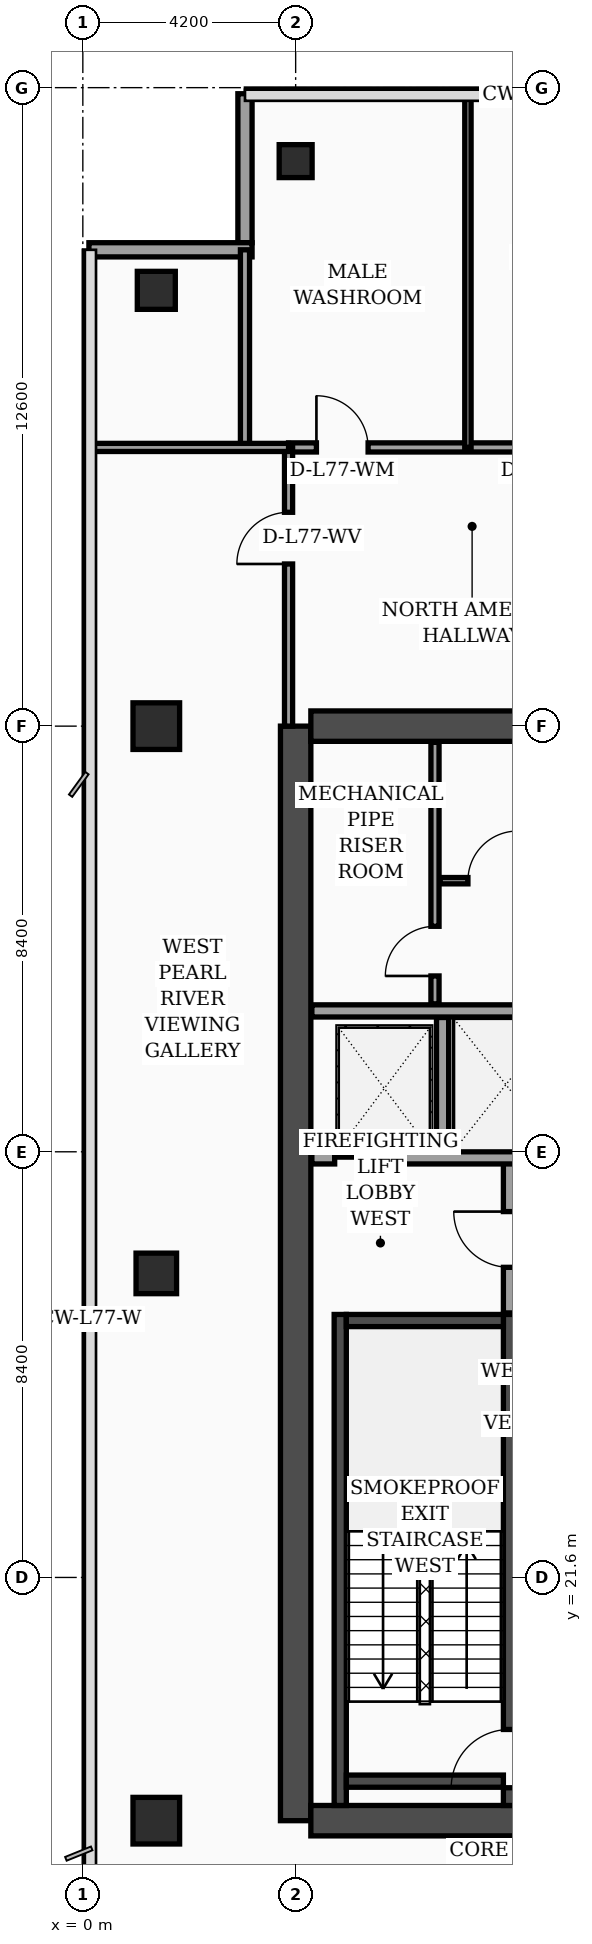
"""IFC4 building model, lengths in metres.
Left out: names, types, materials, properties, quantities, classifications, styles, units other than length and angle.
Written with IfcOpenShell. Run it as: python <this file> out.ifc"""

import sys

from ifc_helpers import new_model, si_unit, direction, frame, frame_2d, origin, origin_2d, place, context, subcontext, project, spatial, rectangle, hollow_rectangle, extrude, element, fill, save


model = new_model("IFC4")
c1 = context("Model", 3, precision=1e-05, world=origin(), true_north=direction((0.0, 1.0)))
c2 = subcontext(c1, "Body", "Model", "MODEL_VIEW")
j1 = project(units=[si_unit("LENGTHUNIT", "METRE"), si_unit("PLANEANGLEUNIT", "RADIAN")], contexts=[c1])
p1 = place(None, origin())
s1 = spatial("IfcSite", under=j1, at=p1, CompositionType="ELEMENT")
p2 = place(p1, origin())
s2 = spatial("IfcBuilding", under=s1, at=p2, CompositionType="ELEMENT")
p3 = place(p2, frame((0.0, 0.0, 311.5)))
s3 = spatial("IfcBuildingStorey", under=s2, at=p3, CompositionType="ELEMENT", Elevation=311.5)
p4 = place(p3, frame((4.2, 16.8, 0.0), z_axis=(0.0, 0.0, 1.0), x_axis=(0.0, 1.0, 0.0)))
e1 = element("IfcWall", 1, at=p4, inside=s3, PredefinedType="SHEAR", context=c2, shape_type="SweptSolid", body=[
    extrude(rectangle(XDim=21.6, YDim=0.6, at=frame_2d((10.8, 0.0))), origin(), (0.0, 0.0, 1.0), 4.26),
])
p5 = place(p3, frame((4.5, 38.4, 0.0), z_axis=(0.0, 0.0, 1.0), x_axis=(1.0, 0.0, 0.0)))
e2 = element("IfcWall", 2, at=p5, inside=s3, PredefinedType="SHEAR", context=c2, shape_type="SweptSolid", body=[
    extrude(rectangle(XDim=10.2, YDim=0.6, at=frame_2d((5.1, 0.0))), origin(), (0.0, 0.0, 1.0), 4.26),
])
p6 = place(p5, frame((5.8, 0.0, 0.0)))
e3 = element("IfcOpeningElement", 3, at=p6, cuts=e2, PredefinedType="OPENING", context=c2, shape_type="SweptSolid", body=[
    extrude(rectangle(XDim=1.1, YDim=2.2, at=frame_2d((0.55, 1.1))), frame((0.0, 0.31, 0.0), z_axis=(0.0, -1.0, 0.0), x_axis=(1.0, 0.0, 0.0)), (0.0, 0.0, 1.0), 0.62),
])
p7 = place(p3, frame((4.5, 16.8, 0.0), z_axis=(0.0, 0.0, 1.0), x_axis=(1.0, 0.0, 0.0)))
e4 = element("IfcWall", 4, at=p7, inside=s3, PredefinedType="SHEAR", context=c2, shape_type="SweptSolid", body=[
    extrude(rectangle(XDim=10.2, YDim=0.6, at=frame_2d((5.1, 0.0))), origin(), (0.0, 0.0, 1.0), 4.26),
])
p8 = place(p3, frame((5.08, 17.1, 0.0), z_axis=(0.0, 0.0, 1.0), x_axis=(0.0, 1.0, 0.0)))
e5 = element("IfcWall", 5, at=p8, inside=s3, PredefinedType="SOLIDWALL", context=c2, shape_type="SweptSolid", body=[
    extrude(rectangle(XDim=9.69, YDim=0.24, at=frame_2d((4.845, 0.0))), origin(), (0.0, 0.0, 1.0), 4.26),
])
p9 = place(p3, frame((8.42, 17.1, 0.0), z_axis=(0.0, 0.0, 1.0), x_axis=(0.0, 1.0, 0.0)))
e6 = element("IfcWall", 6, at=p9, inside=s3, PredefinedType="SOLIDWALL", context=c2, shape_type="SweptSolid", body=[
    extrude(rectangle(XDim=9.69, YDim=0.24, at=frame_2d((4.845, 0.0))), origin(), (0.0, 0.0, 1.0), 4.26),
])
p10 = place(p9, frame((0.35, 0.0, 0.0)))
e7 = element("IfcOpeningElement", 7, at=p10, cuts=e6, PredefinedType="OPENING", context=c2, shape_type="SweptSolid", body=[
    extrude(rectangle(XDim=1.15, YDim=2.2, at=frame_2d((0.575, 1.1))), frame((0.0, 0.13, 0.0), z_axis=(0.0, -1.0, 0.0), x_axis=(1.0, 0.0, 0.0)), (0.0, 0.0, 1.0), 0.26),
])
for number, where, z_axis, x_axis in (
    (8, (5.2, 17.58, 0.0), (0.0, 0.0, 1.0), (1.0, 0.0, 0.0)),
    (9, (5.2, 26.67, 0.0), (0.0, 0.0, 1.0), (1.0, 0.0, 0.0)),
):
    element("IfcWall", number, at=place(p3, frame(where, z_axis=z_axis, x_axis=x_axis)), inside=s3, PredefinedType="SOLIDWALL", context=c2, shape_type="SweptSolid", body=[
        extrude(rectangle(XDim=3.1, YDim=0.24, at=frame_2d((1.55, 0.0))), origin(), (0.0, 0.0, 1.0), 4.26),
    ])
p11 = place(p3, frame((1.45, 16.8, 0.0), z_axis=(0.0, 0.0, 1.0), x_axis=(1.0, 0.0, 0.0)))
e10 = element("IfcColumn", 10, at=p11, inside=s3, PredefinedType="COLUMN", context=c2, shape_type="SweptSolid", body=[
    extrude(rectangle(XDim=0.92, YDim=0.92, at=origin_2d()), origin(), (0.0, 0.0, 1.0), 4.26),
])
p12 = place(p3, frame((1.45, 27.6, 0.0), z_axis=(0.0, 0.0, 1.0), x_axis=(1.0, 0.0, 0.0)))
e11 = element("IfcColumn", 11, at=p12, inside=s3, PredefinedType="COLUMN", context=c2, shape_type="SweptSolid", body=[
    extrude(rectangle(XDim=0.8, YDim=0.8, at=origin_2d()), origin(), (0.0, 0.0, 1.0), 4.26),
])
p13 = place(p3, frame((1.45, 38.4, 0.0), z_axis=(0.0, 0.0, 1.0), x_axis=(1.0, 0.0, 0.0)))
e12 = element("IfcColumn", 12, at=p13, inside=s3, PredefinedType="COLUMN", context=c2, shape_type="SweptSolid", body=[
    extrude(rectangle(XDim=0.92, YDim=0.92, at=origin_2d()), origin(), (0.0, 0.0, 1.0), 4.26),
])
p14 = place(p3, frame((1.45, 47.0, 0.0), z_axis=(0.0, 0.0, 1.0), x_axis=(1.0, 0.0, 0.0)))
e13 = element("IfcColumn", 13, at=p14, inside=s3, PredefinedType="COLUMN", context=c2, shape_type="SweptSolid", body=[
    extrude(hollow_rectangle(XDim=0.75, YDim=0.75, WallThickness=0.032, at=origin_2d()), origin(), (0.0, 0.0, 1.0), 4.26),
])
p15 = place(p3, frame((4.2, 49.55, 0.0), z_axis=(0.0, 0.0, 1.0), x_axis=(1.0, 0.0, 0.0)))
e14 = element("IfcColumn", 14, at=p15, inside=s3, PredefinedType="COLUMN", context=c2, shape_type="SweptSolid", body=[
    extrude(hollow_rectangle(XDim=0.65, YDim=0.65, WallThickness=0.028, at=origin_2d()), origin(), (0.0, 0.0, 1.0), 4.26),
])
p16 = place(p3, frame((3.2, 50.88, 0.0), z_axis=(0.0, 0.0, 1.0), x_axis=(0.0, -1.0, 0.0)))
e15 = element("IfcWall", 15, at=p16, inside=s3, PredefinedType="SOLIDWALL", context=c2, shape_type="SweptSolid", body=[
    extrude(rectangle(XDim=2.94, YDim=0.28, at=frame_2d((1.47, 0.0))), origin(), (0.0, 0.0, 1.0), 3.79),
])
p17 = place(p3, frame((3.34, 47.8, 0.0), z_axis=(0.0, 0.0, 1.0), x_axis=(-1.0, 0.0, 0.0)))
e16 = element("IfcWall", 16, at=p17, inside=s3, PredefinedType="SOLIDWALL", context=c2, shape_type="SweptSolid", body=[
    extrude(rectangle(XDim=3.22, YDim=0.28, at=frame_2d((1.61, 0.0))), origin(), (0.0, 0.0, 1.0), 3.79),
])
p18 = place(p3, frame((8.42, 26.82, 0.0), z_axis=(0.0, 0.0, 1.0), x_axis=(0.0, 1.0, 0.0)))
e17 = element("IfcWall", 17, at=p18, inside=s3, PredefinedType="SOLIDWALL", context=c2, shape_type="SweptSolid", body=[
    extrude(rectangle(XDim=3.0, YDim=0.24, at=frame_2d((1.5, 0.0))), origin(), (0.0, 0.0, 1.0), 4.26),
])
p19 = place(p18, frame((0.9, 0.0, 0.0)))
e18 = element("IfcOpeningElement", 18, at=p19, cuts=e17, PredefinedType="OPENING", context=c2, shape_type="SweptSolid", body=[
    extrude(rectangle(XDim=1.1, YDim=2.2, at=frame_2d((0.55, 1.1))), frame((0.0, 0.13, 0.0), z_axis=(0.0, -1.0, 0.0), x_axis=(1.0, 0.0, 0.0)), (0.0, 0.0, 1.0), 0.26),
])
p20 = place(p3, frame((4.52, 29.88, 0.0), z_axis=(0.0, 0.0, 1.0), x_axis=(1.0, 0.0, 0.0)))
e19 = element("IfcWall", 19, at=p20, inside=s3, PredefinedType="SOLIDWALL", context=c2, shape_type="SweptSolid", body=[
    extrude(rectangle(XDim=4.9, YDim=0.24, at=frame_2d((2.45, 0.0))), origin(), (0.0, 0.0, 1.0), 4.26),
])
p21 = place(p20, frame((0.45, 0.0, 0.0)))
e20 = element("IfcOpeningElement", 20, at=p21, cuts=e19, PredefinedType="OPENING", context=c2, shape_type="SweptSolid", body=[
    extrude(rectangle(XDim=1.3, YDim=2.35, at=frame_2d((0.65, 1.175))), frame((0.0, 0.13, 0.0), z_axis=(0.0, -1.0, 0.0), x_axis=(1.0, 0.0, 0.0)), (0.0, 0.0, 1.0), 0.26),
])
p22 = place(p3, frame((7.1, 30.02, 0.0), z_axis=(0.0, 0.0, 1.0), x_axis=(0.0, 1.0, 0.0)))
e21 = element("IfcWall", 21, at=p22, inside=s3, PredefinedType="SOLIDWALL", context=c2, shape_type="SweptSolid", body=[
    extrude(rectangle(XDim=2.63, YDim=0.24, at=frame_2d((1.315, 0.0))), origin(), (0.0, 0.0, 1.0), 4.26),
])
p23 = place(p3, frame((4.52, 32.78, 0.0), z_axis=(0.0, 0.0, 1.0), x_axis=(1.0, 0.0, 0.0)))
e22 = element("IfcWall", 22, at=p23, inside=s3, PredefinedType="SOLIDWALL", context=c2, shape_type="SweptSolid", body=[
    extrude(rectangle(XDim=4.9, YDim=0.24, at=frame_2d((2.45, 0.0))), origin(), (0.0, 0.0, 1.0), 3.89),
])
p24 = place(p3, frame((6.95, 32.92, 0.0), z_axis=(0.0, 0.0, 1.0), x_axis=(0.0, 1.0, 0.0)))
e23 = element("IfcWall", 23, at=p24, inside=s3, PredefinedType="PARTITIONING", context=c2, shape_type="SweptSolid", body=[
    extrude(rectangle(XDim=5.16, YDim=0.16, at=frame_2d((2.58, 0.0))), origin(), (0.0, 0.0, 1.0), 4.26),
])
p25 = place(p24, frame((0.55, 0.0, 0.0)))
e24 = element("IfcOpeningElement", 24, at=p25, cuts=e23, PredefinedType="OPENING", context=c2, shape_type="SweptSolid", body=[
    extrude(rectangle(XDim=0.98, YDim=2.15, at=frame_2d((0.49, 1.075))), frame((0.0, 0.09, 0.0), z_axis=(0.0, -1.0, 0.0), x_axis=(1.0, 0.0, 0.0)), (0.0, 0.0, 1.0), 0.18),
])
p26 = place(p3, frame((7.05, 35.35, 0.0), z_axis=(0.0, 0.0, 1.0), x_axis=(1.0, 0.0, 0.0)))
e25 = element("IfcWall", 25, at=p26, inside=s3, PredefinedType="PARTITIONING", context=c2, shape_type="SweptSolid", body=[
    extrude(rectangle(XDim=2.37, YDim=0.125, at=frame_2d((1.185, 0.0))), origin(), (0.0, 0.0, 1.0), 4.26),
])
p27 = place(p26, frame((0.55, 0.0, 0.0)))
e26 = element("IfcOpeningElement", 26, at=p27, cuts=e25, PredefinedType="OPENING", context=c2, shape_type="SweptSolid", body=[
    extrude(rectangle(XDim=0.98, YDim=2.15, at=frame_2d((0.49, 1.075))), frame((0.0, 0.073, 0.0), z_axis=(0.0, -1.0, 0.0), x_axis=(1.0, 0.0, 0.0)), (0.0, 0.0, 1.0), 0.145),
])
p28 = place(p3, frame((3.2, 43.9, 0.0), z_axis=(0.0, 0.0, 1.0), x_axis=(0.0, 1.0, 0.0)))
e27 = element("IfcWall", 27, at=p28, inside=s3, PredefinedType="PARTITIONING", context=c2, shape_type="SweptSolid", body=[
    extrude(rectangle(XDim=3.9, YDim=0.18, at=frame_2d((1.95, 0.0))), origin(), (0.0, 0.0, 1.0), 4.26),
])
p29 = place(p3, frame((4.06, 43.9, 0.0), z_axis=(0.0, 0.0, 1.0), x_axis=(1.0, 0.0, 0.0)))
e28 = element("IfcWall", 28, at=p29, inside=s3, PredefinedType="PARTITIONING", context=c2, shape_type="SweptSolid", body=[
    extrude(rectangle(XDim=10.74, YDim=0.18, at=frame_2d((5.37, 0.0))), origin(), (0.0, 0.0, 1.0), 3.69),
])
p30 = place(p29, frame((0.55, 0.0, 0.0)))
e29 = element("IfcOpeningElement", 29, at=p30, cuts=e28, PredefinedType="OPENING", context=c2, shape_type="SweptSolid", body=[
    extrude(rectangle(XDim=1.02, YDim=2.2, at=frame_2d((0.51, 1.1))), frame((0.0, 0.1, 0.0), z_axis=(0.0, -1.0, 0.0), x_axis=(1.0, 0.0, 0.0)), (0.0, 0.0, 1.0), 0.2),
])
p31 = place(p29, frame((4.65, 0.0, 0.0)))
e30 = element("IfcOpeningElement", 30, at=p31, cuts=e28, PredefinedType="OPENING", context=c2, shape_type="SweptSolid", body=[
    extrude(rectangle(XDim=1.02, YDim=2.2, at=frame_2d((0.51, 1.1))), frame((0.0, 0.1, 0.0), z_axis=(0.0, -1.0, 0.0), x_axis=(1.0, 0.0, 0.0)), (0.0, 0.0, 1.0), 0.2),
])
p32 = place(p29, frame((8.4, 0.0, 0.0)))
e31 = element("IfcOpeningElement", 31, at=p32, cuts=e28, PredefinedType="OPENING", context=c2, shape_type="SweptSolid", body=[
    extrude(rectangle(XDim=1.02, YDim=2.2, at=frame_2d((0.51, 1.1))), frame((0.0, 0.1, 0.0), z_axis=(0.0, -1.0, 0.0), x_axis=(1.0, 0.0, 0.0)), (0.0, 0.0, 1.0), 0.2),
])
p33 = place(p3, frame((4.06, 38.4, 0.0), z_axis=(0.0, 0.0, 1.0), x_axis=(0.0, 1.0, 0.0)))
e32 = element("IfcWall", 32, at=p33, inside=s3, PredefinedType="PARTITIONING", context=c2, shape_type="SweptSolid", body=[
    extrude(rectangle(XDim=5.5, YDim=0.16, at=frame_2d((2.75, 0.0))), origin(), (0.0, 0.0, 1.0), 3.69),
])
p34 = place(p33, frame((3.2, 0.0, 0.0)))
e33 = element("IfcOpeningElement", 33, at=p34, cuts=e32, PredefinedType="OPENING", context=c2, shape_type="SweptSolid", body=[
    extrude(rectangle(XDim=1.02, YDim=2.2, at=frame_2d((0.51, 1.1))), frame((0.0, 0.09, 0.0), z_axis=(0.0, -1.0, 0.0), x_axis=(1.0, 0.0, 0.0)), (0.0, 0.0, 1.0), 0.18),
])
p35 = place(p3, frame((0.08, 43.9, 0.0), z_axis=(0.0, 0.0, 1.0), x_axis=(1.0, 0.0, 0.0)))
e34 = element("IfcWall", 34, at=p35, inside=s3, PredefinedType="PARTITIONING", context=c2, shape_type="SweptSolid", body=[
    extrude(rectangle(XDim=3.98, YDim=0.16, at=frame_2d((1.99, 0.0))), origin(), (0.0, 0.0, 1.0), 3.69),
])
p36 = place(p3, frame((7.6, 43.9, 0.0), z_axis=(0.0, 0.0, 1.0), x_axis=(0.0, 1.0, 0.0)))
e35 = element("IfcWall", 35, at=p36, inside=s3, PredefinedType="PARTITIONING", context=c2, shape_type="SweptSolid", body=[
    extrude(rectangle(XDim=7.04, YDim=0.125, at=frame_2d((3.52, 0.0))), origin(), (0.0, 0.0, 1.0), 3.79),
])
p37 = place(p19, origin())
e36 = element("IfcDoor", 36, at=p37, inside=s3, OperationType="SINGLE_SWING_RIGHT", PredefinedType="DOOR", context=c2, shape_type="SweptSolid", body=[
    extrude(rectangle(XDim=1.1, YDim=2.2, at=frame_2d((0.55, 1.1))), frame((0.0, 0.025, 0.0), z_axis=(0.0, -1.0, 0.0), x_axis=(1.0, 0.0, 0.0)), (0.0, 0.0, 1.0), 0.05),
])
fill(e18, e36)
p38 = place(p21, origin())
e37 = element("IfcDoor", 37, at=p38, inside=s3, OperationType="DOUBLE_DOOR_SLIDING", PredefinedType="DOOR", context=c2, shape_type="SweptSolid", body=[
    extrude(rectangle(XDim=1.3, YDim=2.35, at=frame_2d((0.65, 1.175))), frame((0.0, 0.025, 0.0), z_axis=(0.0, -1.0, 0.0), x_axis=(1.0, 0.0, 0.0)), (0.0, 0.0, 1.0), 0.05),
])
fill(e20, e37)
p39 = place(p25, origin())
e38 = element("IfcDoor", 38, at=p39, inside=s3, OperationType="SINGLE_SWING_LEFT", PredefinedType="DOOR", context=c2, shape_type="SweptSolid", body=[
    extrude(rectangle(XDim=0.98, YDim=2.15, at=frame_2d((0.49, 1.075))), frame((0.0, 0.025, 0.0), z_axis=(0.0, -1.0, 0.0), x_axis=(1.0, 0.0, 0.0)), (0.0, 0.0, 1.0), 0.05),
])
fill(e24, e38)
p40 = place(p27, origin())
e39 = element("IfcDoor", 39, at=p40, inside=s3, OperationType="SINGLE_SWING_RIGHT", PredefinedType="DOOR", context=c2, shape_type="SweptSolid", body=[
    extrude(rectangle(XDim=0.98, YDim=2.15, at=frame_2d((0.49, 1.075))), frame((0.0, 0.025, 0.0), z_axis=(0.0, -1.0, 0.0), x_axis=(1.0, 0.0, 0.0)), (0.0, 0.0, 1.0), 0.05),
])
fill(e26, e39)
p41 = place(p30, origin())
e40 = element("IfcDoor", 40, at=p41, inside=s3, OperationType="SINGLE_SWING_LEFT", PredefinedType="DOOR", context=c2, shape_type="SweptSolid", body=[
    extrude(rectangle(XDim=1.02, YDim=2.2, at=frame_2d((0.51, 1.1))), frame((0.0, 0.025, 0.0), z_axis=(0.0, -1.0, 0.0), x_axis=(1.0, 0.0, 0.0)), (0.0, 0.0, 1.0), 0.05),
])
fill(e29, e40)
p42 = place(p34, origin())
e41 = element("IfcDoor", 41, at=p42, inside=s3, OperationType="SINGLE_SWING_LEFT", PredefinedType="DOOR", context=c2, shape_type="SweptSolid", body=[
    extrude(rectangle(XDim=1.02, YDim=2.2, at=frame_2d((0.51, 1.1))), frame((0.0, 0.025, 0.0), z_axis=(0.0, -1.0, 0.0), x_axis=(1.0, 0.0, 0.0)), (0.0, 0.0, 1.0), 0.05),
])
fill(e33, e41)
p43 = place(p10, origin())
e42 = element("IfcDoor", 42, at=p43, inside=s3, OperationType="SINGLE_SWING_LEFT", PredefinedType="DOOR", context=c2, shape_type="SweptSolid", body=[
    extrude(rectangle(XDim=1.15, YDim=2.2, at=frame_2d((0.575, 1.1))), frame((0.0, 0.025, 0.0), z_axis=(0.0, -1.0, 0.0), x_axis=(1.0, 0.0, 0.0)), (0.0, 0.0, 1.0), 0.05),
])
fill(e7, e42)
save(model, sys.argv[1])
